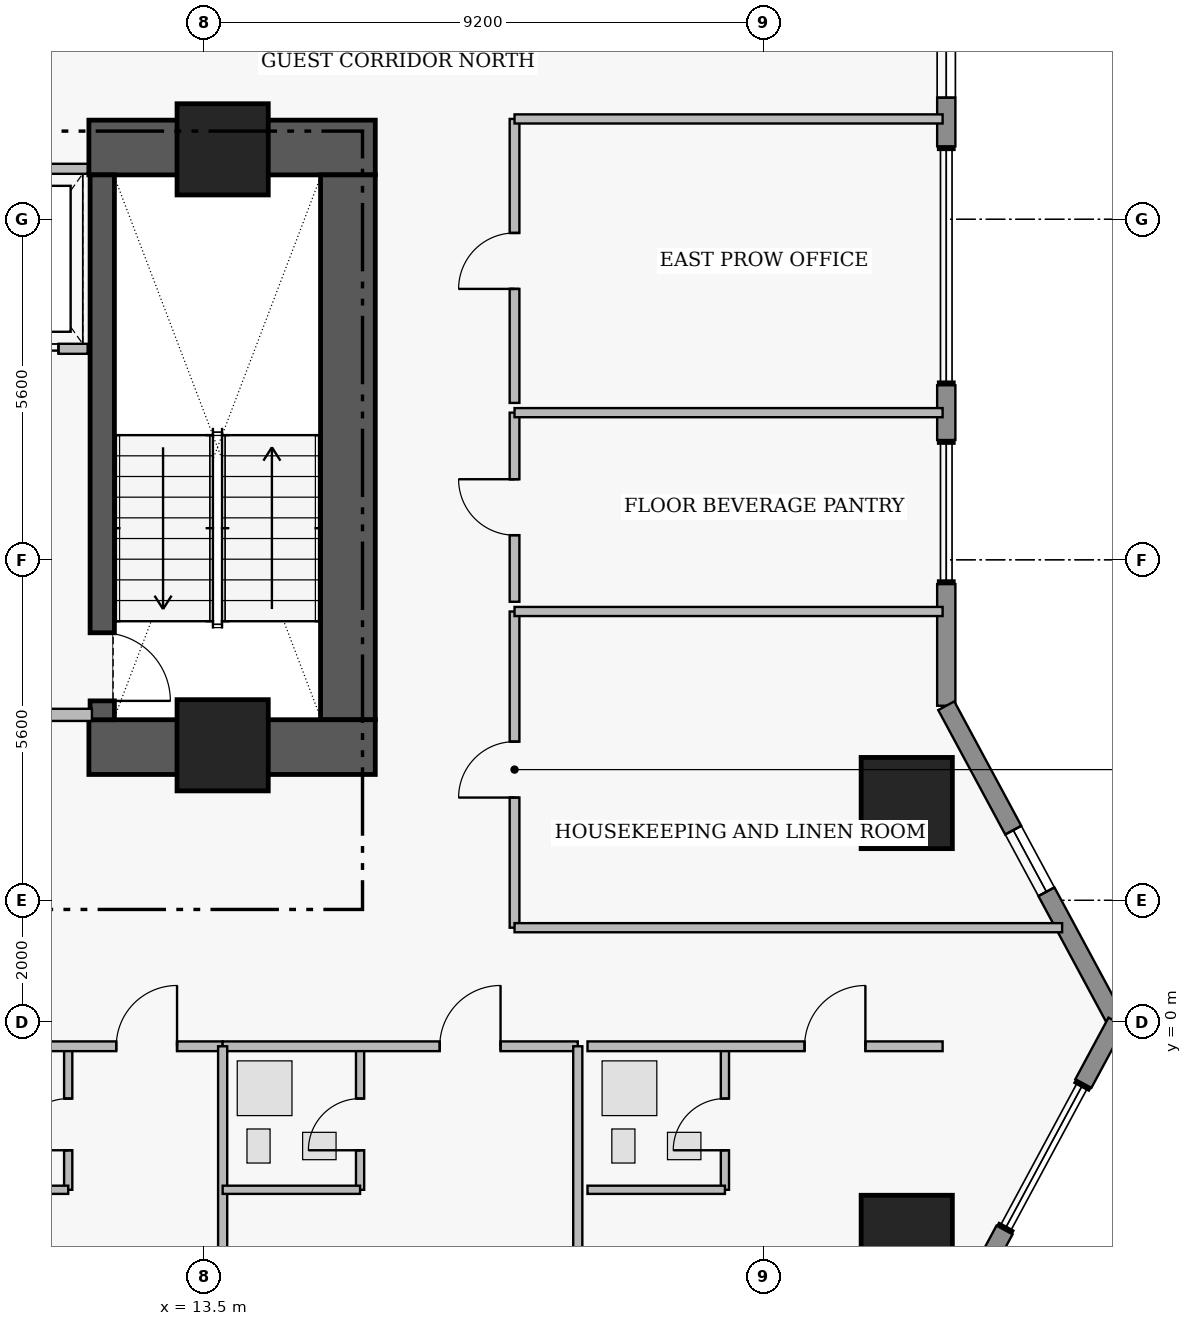
"""IFC4 building model, lengths in metres.
Left out: names, types, materials, properties, quantities, classifications, styles, units other than length and angle.
Written with IfcOpenShell. Run it as: python <this file> out.ifc"""

import sys

from ifc_helpers import new_model, si_unit, direction, frame, frame_2d, origin, origin_2d, place, context, subcontext, project, spatial, rectangle, extrude, element, fill, save


model = new_model("IFC4")
c1 = context("Model", 3, precision=1e-05, world=origin(), true_north=direction((0.0, 1.0)))
c2 = subcontext(c1, "Body", "Model", "MODEL_VIEW")
j1 = project(units=[si_unit("LENGTHUNIT", "METRE"), si_unit("PLANEANGLEUNIT", "RADIAN")], contexts=[c1])
p1 = place(None, origin())
s1 = spatial("IfcSite", under=j1, at=p1, CompositionType="ELEMENT")
p2 = place(p1, origin())
s2 = spatial("IfcBuilding", under=s1, at=p2, CompositionType="ELEMENT")
p3 = place(p2, frame((0.0, 0.0, 60.45)))
s3 = spatial("IfcBuildingStorey", under=s2, at=p3, CompositionType="ELEMENT", Elevation=60.45)
p4 = place(p3, frame((11.6, 14.38, 0.0), z_axis=(0.0, 0.0, 1.0), x_axis=(1.0, 0.0, 0.0)))
e1 = element("IfcWall", 1, at=p4, inside=s3, PredefinedType="SHEAR", context=c2, shape_type="SweptSolid", body=[
    extrude(rectangle(XDim=4.71, YDim=0.9, at=frame_2d((2.355, 0.0))), origin(), (0.0, 0.0, 1.0), 3.46),
])
p5 = place(p3, frame((15.86, 4.97, 0.0), z_axis=(0.0, 0.0, 1.0), x_axis=(0.0, 1.0, 0.0)))
e2 = element("IfcWall", 2, at=p5, inside=s3, PredefinedType="SHEAR", context=c2, shape_type="SweptSolid", body=[
    extrude(rectangle(XDim=8.96, YDim=0.9, at=frame_2d((4.48, 0.0))), origin(), (0.0, 0.0, 1.0), 3.46),
])
p6 = place(p3, frame((11.6, 4.52, 0.0), z_axis=(0.0, 0.0, 1.0), x_axis=(1.0, 0.0, 0.0)))
e3 = element("IfcWall", 3, at=p6, inside=s3, PredefinedType="SHEAR", context=c2, shape_type="SweptSolid", body=[
    extrude(rectangle(XDim=4.71, YDim=0.9, at=frame_2d((2.355, 0.0))), origin(), (0.0, 0.0, 1.0), 3.46),
])
p7 = place(p3, frame((11.82, 13.93, 0.0), z_axis=(0.0, 0.0, 1.0), x_axis=(0.0, -1.0, 0.0)))
e4 = element("IfcWall", 4, at=p7, inside=s3, PredefinedType="SHEAR", context=c2, shape_type="SweptSolid", body=[
    extrude(rectangle(XDim=8.96, YDim=0.4, at=frame_2d((4.48, 0.0))), origin(), (0.0, 0.0, 1.0), 3.46),
])
p8 = place(p7, frame((7.53, 0.0, 0.0)))
e5 = element("IfcOpeningElement", 5, at=p8, cuts=e4, PredefinedType="OPENING", context=c2, shape_type="SweptSolid", body=[
    extrude(rectangle(XDim=1.12, YDim=2.22, at=frame_2d((0.56, 1.11))), frame((0.0, 0.21, 0.0), z_axis=(0.0, -1.0, 0.0), x_axis=(1.0, 0.0, 0.0)), (0.0, 0.0, 1.0), 0.42),
])
for number, where, z_axis, x_axis in (
    (6, (13.8, 14.35, 0.0), (0.0, 0.0, 1.0), (1.0, 0.0, 0.0)),
    (7, (13.8, 4.55, 0.0), (0.0, 0.0, 1.0), (1.0, 0.0, 0.0)),
    (8, (25.05, -3.6, 0.0), (0.0, 0.0, 1.0), (1.0, 0.0, 0.0)),
    (9, (25.05, 3.6, 0.0), (0.0, 0.0, 1.0), (1.0, 0.0, 0.0)),
):
    element("IfcColumn", number, at=place(p3, frame(where, z_axis=z_axis, x_axis=x_axis)), inside=s3, PredefinedType="COLUMN", context=c2, shape_type="SweptSolid", body=[
        extrude(rectangle(XDim=1.5, YDim=1.5, at=origin_2d()), origin(), (0.0, 0.0, 1.0), 3.65),
    ])
p9 = place(p3, frame((25.7, 19.5, 0.0), z_axis=(0.0, 0.0, 1.0), x_axis=(0.0, -1.0, 0.0)))
e10 = element("IfcWall", 10, at=p9, inside=s3, PredefinedType="STANDARD", context=c2, shape_type="SweptSolid", body=[
    extrude(rectangle(XDim=5.1, YDim=0.3, at=frame_2d((2.55, 0.0))), origin(), (0.0, 0.0, 1.0), 3.43),
])
p10 = place(p9, frame((0.66, 0.0, 0.85)))
e11 = element("IfcOpeningElement", 11, at=p10, cuts=e10, PredefinedType="OPENING", context=c2, shape_type="SweptSolid", body=[
    extrude(rectangle(XDim=1.6, YDim=1.8, at=frame_2d((0.8, 0.9))), frame((0.0, 0.16, 0.0), z_axis=(0.0, -1.0, 0.0), x_axis=(1.0, 0.0, 0.0)), (0.0, 0.0, 1.0), 0.32),
])
p11 = place(p9, frame((3.15, 0.0, 0.95)))
e12 = element("IfcOpeningElement", 12, at=p11, cuts=e10, PredefinedType="OPENING", context=c2, shape_type="SweptSolid", body=[
    extrude(rectangle(XDim=1.15, YDim=1.55, at=frame_2d((0.575, 0.775))), frame((0.0, 0.16, 0.0), z_axis=(0.0, -1.0, 0.0), x_axis=(1.0, 0.0, 0.0)), (0.0, 0.0, 1.0), 0.32),
])
p12 = place(p3, frame((25.7, 10.47, 0.0), z_axis=(0.0, 0.0, 1.0), x_axis=(0.0, -1.0, 0.0)))
e13 = element("IfcWall", 13, at=p12, inside=s3, PredefinedType="STANDARD", context=c2, shape_type="SweptSolid", body=[
    extrude(rectangle(XDim=0.9, YDim=0.3, at=frame_2d((0.45, 0.0))), origin(), (0.0, 0.0, 1.0), 3.43),
])
p13 = place(p3, frame((25.7, 7.2, 0.0), z_axis=(0.0, 0.0, 1.0), x_axis=(0.0, -1.0, 0.0)))
e14 = element("IfcWall", 14, at=p13, inside=s3, PredefinedType="STANDARD", context=c2, shape_type="SweptSolid", body=[
    extrude(rectangle(XDim=2.0, YDim=0.3, at=frame_2d((1.0, 0.0))), origin(), (0.0, 0.0, 1.0), 3.43),
])
p14 = place(p3, frame((25.7, 5.2, 0.0), z_axis=(0.0, 0.0, 1.0), x_axis=(0.474109683532, -0.880465790352, 0.0)))
e15 = element("IfcWall", 15, at=p14, inside=s3, PredefinedType="STANDARD", context=c2, shape_type="SweptSolid", body=[
    extrude(rectangle(XDim=5.906, YDim=0.3, at=frame_2d((2.953, 0.0))), origin(), (0.0, 0.0, 1.0), 3.43),
])
p15 = place(p14, frame((2.324, 0.0, 0.95)))
e16 = element("IfcOpeningElement", 16, at=p15, cuts=e15, PredefinedType="OPENING", context=c2, shape_type="SweptSolid", body=[
    extrude(rectangle(XDim=1.15, YDim=1.55, at=frame_2d((0.575, 0.775))), frame((0.0, 0.16, 0.0), z_axis=(0.0, -1.0, 0.0), x_axis=(1.0, 0.0, 0.0)), (0.0, 0.0, 1.0), 0.32),
])
p16 = place(p3, frame((28.5, 0.0, 0.0), z_axis=(0.0, 0.0, 1.0), x_axis=(-0.474099823035, -0.880471099922, 0.0)))
e17 = element("IfcWall", 17, at=p16, inside=s3, PredefinedType="STANDARD", context=c2, shape_type="SweptSolid", body=[
    extrude(rectangle(XDim=1.15, YDim=0.3, at=frame_2d((0.575, 0.0))), origin(), (0.0, 0.0, 1.0), 3.43),
])
p17 = place(p3, frame((26.658, -3.421, 0.0), z_axis=(0.0, 0.0, 1.0), x_axis=(-0.474121438562, -0.88045946045, 0.0)))
e18 = element("IfcWall", 18, at=p17, inside=s3, PredefinedType="STANDARD", context=c2, shape_type="SweptSolid", body=[
    extrude(rectangle(XDim=2.021, YDim=0.3, at=frame_2d((1.01, 0.0))), origin(), (0.0, 0.0, 1.0), 3.43),
])
p18 = place(p3, frame((9.42, 11.07, 0.0), z_axis=(0.0, 0.0, 1.0), x_axis=(1.0, 0.0, 0.0)))
e19 = element("IfcWall", 19, at=p18, inside=s3, PredefinedType="PARTITIONING", context=c2, shape_type="SweptSolid", body=[
    extrude(rectangle(XDim=2.16, YDim=0.165, at=frame_2d((1.08, 0.0))), origin(), (0.0, 0.0, 1.0), 3.43),
])
p19 = place(p18, frame((0.53, 0.0, 0.0)))
e20 = element("IfcOpeningElement", 20, at=p19, cuts=e19, PredefinedType="OPENING", context=c2, shape_type="SweptSolid", body=[
    extrude(rectangle(XDim=1.15, YDim=2.25, at=frame_2d((0.575, 1.125))), frame((0.0, 0.093, 0.0), z_axis=(0.0, -1.0, 0.0), x_axis=(1.0, 0.0, 0.0)), (0.0, 0.0, 1.0), 0.185),
])
p20 = place(p3, frame((11.26, -2.76, 0.0), z_axis=(0.0, 0.0, 1.0), x_axis=(0.0, 1.0, 0.0)))
e21 = element("IfcWall", 21, at=p20, inside=s3, PredefinedType="PLUMBINGWALL", context=c2, shape_type="SweptSolid", body=[
    extrude(rectangle(XDim=2.36, YDim=0.135, at=frame_2d((1.18, 0.0))), origin(), (0.0, 0.0, 1.0), 3.43),
])
p21 = place(p20, frame((0.65, 0.0, 0.0)))
e22 = element("IfcOpeningElement", 22, at=p21, cuts=e21, PredefinedType="OPENING", context=c2, shape_type="SweptSolid", body=[
    extrude(rectangle(XDim=0.85, YDim=2.1, at=frame_2d((0.425, 1.05))), frame((0.0, 0.077, 0.0), z_axis=(0.0, -1.0, 0.0), x_axis=(1.0, 0.0, 0.0)), (0.0, 0.0, 1.0), 0.155),
])
p22 = place(p3, frame((9.0, -0.4, 0.0), z_axis=(0.0, 0.0, 1.0), x_axis=(1.0, 0.0, 0.0)))
e23 = element("IfcWall", 23, at=p22, inside=s3, PredefinedType="PARTITIONING", context=c2, shape_type="SweptSolid", body=[
    extrude(rectangle(XDim=4.8, YDim=0.16, at=frame_2d((2.4, 0.0))), origin(), (0.0, 0.0, 1.0), 3.43),
])
p23 = place(p22, frame((3.05, 0.0, 0.0)))
e24 = element("IfcOpeningElement", 24, at=p23, cuts=e23, PredefinedType="OPENING", context=c2, shape_type="SweptSolid", body=[
    extrude(rectangle(XDim=1.0, YDim=2.15, at=frame_2d((0.5, 1.075))), frame((0.0, 0.09, 0.0), z_axis=(0.0, -1.0, 0.0), x_axis=(1.0, 0.0, 0.0)), (0.0, 0.0, 1.0), 0.18),
])
p24 = place(p3, frame((16.06, -2.76, 0.0), z_axis=(0.0, 0.0, 1.0), x_axis=(0.0, 1.0, 0.0)))
e25 = element("IfcWall", 25, at=p24, inside=s3, PredefinedType="PLUMBINGWALL", context=c2, shape_type="SweptSolid", body=[
    extrude(rectangle(XDim=2.36, YDim=0.135, at=frame_2d((1.18, 0.0))), origin(), (0.0, 0.0, 1.0), 3.43),
])
p25 = place(p24, frame((0.65, 0.0, 0.0)))
e26 = element("IfcOpeningElement", 26, at=p25, cuts=e25, PredefinedType="OPENING", context=c2, shape_type="SweptSolid", body=[
    extrude(rectangle(XDim=0.85, YDim=2.1, at=frame_2d((0.425, 1.05))), frame((0.0, 0.077, 0.0), z_axis=(0.0, -1.0, 0.0), x_axis=(1.0, 0.0, 0.0)), (0.0, 0.0, 1.0), 0.155),
])
p26 = place(p3, frame((13.8, -0.4, 0.0), z_axis=(0.0, 0.0, 1.0), x_axis=(1.0, 0.0, 0.0)))
e27 = element("IfcWall", 27, at=p26, inside=s3, PredefinedType="PARTITIONING", context=c2, shape_type="SweptSolid", body=[
    extrude(rectangle(XDim=5.84, YDim=0.16, at=frame_2d((2.92, 0.0))), origin(), (0.0, 0.0, 1.0), 3.43),
])
p27 = place(p26, frame((3.57, 0.0, 0.0)))
e28 = element("IfcOpeningElement", 28, at=p27, cuts=e27, PredefinedType="OPENING", context=c2, shape_type="SweptSolid", body=[
    extrude(rectangle(XDim=1.0, YDim=2.15, at=frame_2d((0.5, 1.075))), frame((0.0, 0.09, 0.0), z_axis=(0.0, -1.0, 0.0), x_axis=(1.0, 0.0, 0.0)), (0.0, 0.0, 1.0), 0.18),
])
p28 = place(p3, frame((22.06, -2.76, 0.0), z_axis=(0.0, 0.0, 1.0), x_axis=(0.0, 1.0, 0.0)))
e29 = element("IfcWall", 29, at=p28, inside=s3, PredefinedType="PLUMBINGWALL", context=c2, shape_type="SweptSolid", body=[
    extrude(rectangle(XDim=2.36, YDim=0.135, at=frame_2d((1.18, 0.0))), origin(), (0.0, 0.0, 1.0), 3.43),
])
p29 = place(p28, frame((0.65, 0.0, 0.0)))
e30 = element("IfcOpeningElement", 30, at=p29, cuts=e29, PredefinedType="OPENING", context=c2, shape_type="SweptSolid", body=[
    extrude(rectangle(XDim=0.85, YDim=2.1, at=frame_2d((0.425, 1.05))), frame((0.0, 0.077, 0.0), z_axis=(0.0, -1.0, 0.0), x_axis=(1.0, 0.0, 0.0)), (0.0, 0.0, 1.0), 0.155),
])
p30 = place(p3, frame((19.8, -0.4, 0.0), z_axis=(0.0, 0.0, 1.0), x_axis=(1.0, 0.0, 0.0)))
e31 = element("IfcWall", 31, at=p30, inside=s3, PredefinedType="PARTITIONING", context=c2, shape_type="SweptSolid", body=[
    extrude(rectangle(XDim=5.84, YDim=0.16, at=frame_2d((2.92, 0.0))), origin(), (0.0, 0.0, 1.0), 3.43),
])
p31 = place(p30, frame((3.57, 0.0, 0.0)))
e32 = element("IfcOpeningElement", 32, at=p31, cuts=e31, PredefinedType="OPENING", context=c2, shape_type="SweptSolid", body=[
    extrude(rectangle(XDim=1.0, YDim=2.15, at=frame_2d((0.5, 1.075))), frame((0.0, 0.09, 0.0), z_axis=(0.0, -1.0, 0.0), x_axis=(1.0, 0.0, 0.0)), (0.0, 0.0, 1.0), 0.18),
])
p32 = place(p3, frame((18.6, 1.55, 0.0), z_axis=(0.0, 0.0, 1.0), x_axis=(0.0, 1.0, 0.0)))
e33 = element("IfcWall", 33, at=p32, inside=s3, PredefinedType="PARTITIONING", context=c2, shape_type="SweptSolid", body=[
    extrude(rectangle(XDim=5.2, YDim=0.16, at=frame_2d((2.6, 0.0))), origin(), (0.0, 0.0, 1.0), 3.43),
])
p33 = place(p32, frame((2.14, 0.0, 0.0)))
e34 = element("IfcOpeningElement", 34, at=p33, cuts=e33, PredefinedType="OPENING", context=c2, shape_type="SweptSolid", body=[
    extrude(rectangle(XDim=0.92, YDim=2.12, at=frame_2d((0.46, 1.06))), frame((0.0, 0.09, 0.0), z_axis=(0.0, -1.0, 0.0), x_axis=(1.0, 0.0, 0.0)), (0.0, 0.0, 1.0), 0.18),
])
p34 = place(p3, frame((18.6, 6.91, 0.0), z_axis=(0.0, 0.0, 1.0), x_axis=(0.0, 1.0, 0.0)))
e35 = element("IfcWall", 35, at=p34, inside=s3, PredefinedType="PARTITIONING", context=c2, shape_type="SweptSolid", body=[
    extrude(rectangle(XDim=3.11, YDim=0.16, at=frame_2d((1.555, 0.0))), origin(), (0.0, 0.0, 1.0), 3.43),
])
p35 = place(p34, frame((1.095, 0.0, 0.0)))
e36 = element("IfcOpeningElement", 36, at=p35, cuts=e35, PredefinedType="OPENING", context=c2, shape_type="SweptSolid", body=[
    extrude(rectangle(XDim=0.92, YDim=2.12, at=frame_2d((0.46, 1.06))), frame((0.0, 0.09, 0.0), z_axis=(0.0, -1.0, 0.0), x_axis=(1.0, 0.0, 0.0)), (0.0, 0.0, 1.0), 0.18),
])
p36 = place(p3, frame((18.6, 10.18, 0.0), z_axis=(0.0, 0.0, 1.0), x_axis=(0.0, 1.0, 0.0)))
e37 = element("IfcWall", 37, at=p36, inside=s3, PredefinedType="PARTITIONING", context=c2, shape_type="SweptSolid", body=[
    extrude(rectangle(XDim=4.67, YDim=0.16, at=frame_2d((2.335, 0.0))), origin(), (0.0, 0.0, 1.0), 3.43),
])
p37 = place(p36, frame((1.875, 0.0, 0.0)))
e38 = element("IfcOpeningElement", 38, at=p37, cuts=e37, PredefinedType="OPENING", context=c2, shape_type="SweptSolid", body=[
    extrude(rectangle(XDim=0.92, YDim=2.12, at=frame_2d((0.46, 1.06))), frame((0.0, 0.09, 0.0), z_axis=(0.0, -1.0, 0.0), x_axis=(1.0, 0.0, 0.0)), (0.0, 0.0, 1.0), 0.18),
])
p38 = place(p3, frame((8.8, 5.05, 0.0), z_axis=(0.0, 0.0, 1.0), x_axis=(1.0, 0.0, 0.0)))
e39 = element("IfcWall", 39, at=p38, inside=s3, PredefinedType="PARTITIONING", context=c2, shape_type="SweptSolid", body=[
    extrude(rectangle(XDim=2.85, YDim=0.2, at=frame_2d((1.425, 0.0))), origin(), (0.0, 0.0, 1.0), 3.43),
])
p39 = place(p3, frame((9.42, 14.03, 0.0), z_axis=(0.0, 0.0, 1.0), x_axis=(1.0, 0.0, 0.0)))
e40 = element("IfcWall", 40, at=p39, inside=s3, PredefinedType="PARTITIONING", context=c2, shape_type="SweptSolid", body=[
    extrude(rectangle(XDim=2.16, YDim=0.165, at=frame_2d((1.08, 0.0))), origin(), (0.0, 0.0, 1.0), 3.43),
])
p40 = place(p3, frame((9.0, -2.76, 0.0), z_axis=(0.0, 0.0, 1.0), x_axis=(1.0, 0.0, 0.0)))
e41 = element("IfcWall", 41, at=p40, inside=s3, PredefinedType="PLUMBINGWALL", context=c2, shape_type="SweptSolid", body=[
    extrude(rectangle(XDim=2.26, YDim=0.135, at=frame_2d((1.13, 0.0))), origin(), (0.0, 0.0, 1.0), 3.43),
])
p41 = place(p3, frame((13.8, -23.02, 0.0), z_axis=(0.0, 0.0, 1.0), x_axis=(0.0, 1.0, 0.0)))
e42 = element("IfcWall", 42, at=p41, inside=s3, PredefinedType="PARTITIONING", context=c2, shape_type="SweptSolid", body=[
    extrude(rectangle(XDim=22.62, YDim=0.15, at=frame_2d((11.31, 0.0))), origin(), (0.0, 0.0, 1.0), 2.668),
])
p42 = place(p3, frame((13.8, -2.76, 0.0), z_axis=(0.0, 0.0, 1.0), x_axis=(1.0, 0.0, 0.0)))
e43 = element("IfcWall", 43, at=p42, inside=s3, PredefinedType="PLUMBINGWALL", context=c2, shape_type="SweptSolid", body=[
    extrude(rectangle(XDim=2.26, YDim=0.135, at=frame_2d((1.13, 0.0))), origin(), (0.0, 0.0, 1.0), 3.43),
])
p43 = place(p3, frame((19.64, -23.02, 0.0), z_axis=(0.0, 0.0, 1.0), x_axis=(0.0, 1.0, 0.0)))
e44 = element("IfcWall", 44, at=p43, inside=s3, PredefinedType="PARTITIONING", context=c2, shape_type="SweptSolid", body=[
    extrude(rectangle(XDim=22.62, YDim=0.15, at=frame_2d((11.31, 0.0))), origin(), (0.0, 0.0, 1.0), 3.43),
])
p44 = place(p3, frame((19.8, -2.76, 0.0), z_axis=(0.0, 0.0, 1.0), x_axis=(1.0, 0.0, 0.0)))
e45 = element("IfcWall", 45, at=p44, inside=s3, PredefinedType="PLUMBINGWALL", context=c2, shape_type="SweptSolid", body=[
    extrude(rectangle(XDim=2.26, YDim=0.135, at=frame_2d((1.13, 0.0))), origin(), (0.0, 0.0, 1.0), 3.43),
])
p45 = place(p3, frame((18.6, 1.55, 0.0), z_axis=(0.0, 0.0, 1.0), x_axis=(1.0, 0.0, 0.0)))
e46 = element("IfcWall", 46, at=p45, inside=s3, PredefinedType="PARTITIONING", context=c2, shape_type="SweptSolid", body=[
    extrude(rectangle(XDim=9.005, YDim=0.15, at=frame_2d((4.503, 0.0))), origin(), (0.0, 0.0, 1.0), 3.43),
])
for number, where, z_axis, x_axis in (
    (47, (18.6, 6.75, 0.0), (0.0, 0.0, 1.0), (1.0, 0.0, 0.0)),
    (48, (18.6, 10.02, 0.0), (0.0, 0.0, 1.0), (1.0, 0.0, 0.0)),
    (49, (18.6, 14.85, 0.0), (0.0, 0.0, 1.0), (1.0, 0.0, 0.0)),
):
    element("IfcWall", number, at=place(p3, frame(where, z_axis=z_axis, x_axis=x_axis)), inside=s3, PredefinedType="PARTITIONING", context=c2, shape_type="SweptSolid", body=[
        extrude(rectangle(XDim=7.04, YDim=0.15, at=frame_2d((3.52, 0.0))), origin(), (0.0, 0.0, 1.0), 3.43),
    ])
p46 = place(p11, origin())
e50 = element("IfcWindow", 50, at=p46, inside=s3, PartitioningType="SINGLE_PANEL", PredefinedType="WINDOW", context=c2, shape_type="SweptSolid", body=[
    extrude(rectangle(XDim=1.15, YDim=1.55, at=frame_2d((0.575, 0.775))), frame((0.0, 0.03, 0.0), z_axis=(0.0, -1.0, 0.0), x_axis=(1.0, 0.0, 0.0)), (0.0, 0.0, 1.0), 0.06),
])
fill(e12, e50)
p47 = place(p15, origin())
e51 = element("IfcWindow", 51, at=p47, inside=s3, PartitioningType="SINGLE_PANEL", PredefinedType="WINDOW", context=c2, shape_type="SweptSolid", body=[
    extrude(rectangle(XDim=1.15, YDim=1.55, at=frame_2d((0.575, 0.775))), frame((0.0, 0.03, 0.0), z_axis=(0.0, -1.0, 0.0), x_axis=(1.0, 0.0, 0.0)), (0.0, 0.0, 1.0), 0.06),
])
fill(e16, e51)
p48 = place(p8, origin())
e52 = element("IfcDoor", 52, at=p48, inside=s3, OperationType="SINGLE_SWING_RIGHT", PredefinedType="DOOR", context=c2, shape_type="SweptSolid", body=[
    extrude(rectangle(XDim=1.12, YDim=2.22, at=frame_2d((0.56, 1.11))), frame((0.0, 0.025, 0.0), z_axis=(0.0, -1.0, 0.0), x_axis=(1.0, 0.0, 0.0)), (0.0, 0.0, 1.0), 0.05),
])
fill(e5, e52)
p49 = place(p19, origin())
e53 = element("IfcDoor", 53, at=p49, inside=s3, OperationType="SLIDING_TO_LEFT", PredefinedType="DOOR", context=c2, shape_type="SweptSolid", body=[
    extrude(rectangle(XDim=1.15, YDim=2.25, at=frame_2d((0.575, 1.125))), frame((0.0, 0.025, 0.0), z_axis=(0.0, -1.0, 0.0), x_axis=(1.0, 0.0, 0.0)), (0.0, 0.0, 1.0), 0.05),
])
fill(e20, e53)
p50 = place(p21, origin())
e54 = element("IfcDoor", 54, at=p50, inside=s3, OperationType="SINGLE_SWING_LEFT", PredefinedType="DOOR", context=c2, shape_type="SweptSolid", body=[
    extrude(rectangle(XDim=0.85, YDim=2.1, at=frame_2d((0.425, 1.05))), frame((0.0, 0.025, 0.0), z_axis=(0.0, -1.0, 0.0), x_axis=(1.0, 0.0, 0.0)), (0.0, 0.0, 1.0), 0.05),
])
fill(e22, e54)
p51 = place(p23, origin())
e55 = element("IfcDoor", 55, at=p51, inside=s3, OperationType="SINGLE_SWING_RIGHT", PredefinedType="DOOR", context=c2, shape_type="SweptSolid", body=[
    extrude(rectangle(XDim=1.0, YDim=2.15, at=frame_2d((0.5, 1.075))), frame((0.0, 0.025, 0.0), z_axis=(0.0, -1.0, 0.0), x_axis=(1.0, 0.0, 0.0)), (0.0, 0.0, 1.0), 0.05),
])
fill(e24, e55)
p52 = place(p25, origin())
e56 = element("IfcDoor", 56, at=p52, inside=s3, OperationType="SINGLE_SWING_LEFT", PredefinedType="DOOR", context=c2, shape_type="SweptSolid", body=[
    extrude(rectangle(XDim=0.85, YDim=2.1, at=frame_2d((0.425, 1.05))), frame((0.0, 0.025, 0.0), z_axis=(0.0, -1.0, 0.0), x_axis=(1.0, 0.0, 0.0)), (0.0, 0.0, 1.0), 0.05),
])
fill(e26, e56)
p53 = place(p27, origin())
e57 = element("IfcDoor", 57, at=p53, inside=s3, OperationType="SINGLE_SWING_RIGHT", PredefinedType="DOOR", context=c2, shape_type="SweptSolid", body=[
    extrude(rectangle(XDim=1.0, YDim=2.15, at=frame_2d((0.5, 1.075))), frame((0.0, 0.025, 0.0), z_axis=(0.0, -1.0, 0.0), x_axis=(1.0, 0.0, 0.0)), (0.0, 0.0, 1.0), 0.05),
])
fill(e28, e57)
p54 = place(p29, origin())
e58 = element("IfcDoor", 58, at=p54, inside=s3, OperationType="SINGLE_SWING_LEFT", PredefinedType="DOOR", context=c2, shape_type="SweptSolid", body=[
    extrude(rectangle(XDim=0.85, YDim=2.1, at=frame_2d((0.425, 1.05))), frame((0.0, 0.025, 0.0), z_axis=(0.0, -1.0, 0.0), x_axis=(1.0, 0.0, 0.0)), (0.0, 0.0, 1.0), 0.05),
])
fill(e30, e58)
p55 = place(p31, origin())
e59 = element("IfcDoor", 59, at=p55, inside=s3, OperationType="SINGLE_SWING_RIGHT", PredefinedType="DOOR", context=c2, shape_type="SweptSolid", body=[
    extrude(rectangle(XDim=1.0, YDim=2.15, at=frame_2d((0.5, 1.075))), frame((0.0, 0.025, 0.0), z_axis=(0.0, -1.0, 0.0), x_axis=(1.0, 0.0, 0.0)), (0.0, 0.0, 1.0), 0.05),
])
fill(e32, e59)
p56 = place(p33, origin())
e60 = element("IfcDoor", 60, at=p56, inside=s3, OperationType="SINGLE_SWING_LEFT", PredefinedType="DOOR", context=c2, shape_type="SweptSolid", body=[
    extrude(rectangle(XDim=0.92, YDim=2.12, at=frame_2d((0.46, 1.06))), frame((0.0, 0.025, 0.0), z_axis=(0.0, -1.0, 0.0), x_axis=(1.0, 0.0, 0.0)), (0.0, 0.0, 1.0), 0.05),
])
fill(e34, e60)
p57 = place(p35, origin())
e61 = element("IfcDoor", 61, at=p57, inside=s3, OperationType="SINGLE_SWING_RIGHT", PredefinedType="DOOR", context=c2, shape_type="SweptSolid", body=[
    extrude(rectangle(XDim=0.92, YDim=2.12, at=frame_2d((0.46, 1.06))), frame((0.0, 0.025, 0.0), z_axis=(0.0, -1.0, 0.0), x_axis=(1.0, 0.0, 0.0)), (0.0, 0.0, 1.0), 0.05),
])
fill(e36, e61)
p58 = place(p37, origin())
e62 = element("IfcDoor", 62, at=p58, inside=s3, OperationType="SINGLE_SWING_LEFT", PredefinedType="DOOR", context=c2, shape_type="SweptSolid", body=[
    extrude(rectangle(XDim=0.92, YDim=2.12, at=frame_2d((0.46, 1.06))), frame((0.0, 0.025, 0.0), z_axis=(0.0, -1.0, 0.0), x_axis=(1.0, 0.0, 0.0)), (0.0, 0.0, 1.0), 0.05),
])
fill(e38, e62)
save(model, sys.argv[1])
